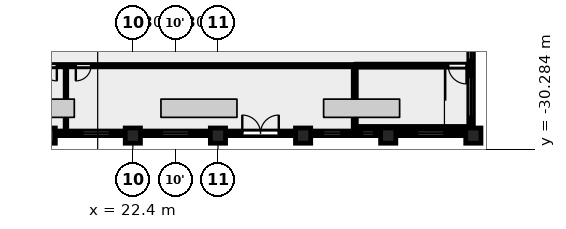
"""IFC4 building model, lengths in metres.
Left out: names, types, materials, properties, quantities, classifications, styles, units other than length and angle.
Written with IfcOpenShell. Run it as: python <this file> out.ifc"""

import sys

from ifc_helpers import new_model, si_unit, direction, frame, frame_2d, origin, origin_2d, place, context, subcontext, project, spatial, rectangle, circle, extrude, element, fill, save


model = new_model("IFC4")
c1 = context("Model", 3, precision=1e-05, world=origin(), true_north=direction((0.0, 1.0)))
c2 = subcontext(c1, "Body", "Model", "MODEL_VIEW")
j1 = project(units=[si_unit("LENGTHUNIT", "METRE"), si_unit("PLANEANGLEUNIT", "RADIAN")], contexts=[c1])
p1 = place(None, origin())
s1 = spatial("IfcSite", under=j1, at=p1, CompositionType="ELEMENT")
p2 = place(p1, origin())
s2 = spatial("IfcBuilding", under=s1, at=p2, CompositionType="ELEMENT")
p3 = place(p2, frame((0.0, 0.0, 25.7)))
s3 = spatial("IfcBuildingStorey", under=s2, at=p3, CompositionType="ELEMENT", Elevation=25.7)
for number, where, z_axis, x_axis in (
    (1, (16.8, -29.4, 0.0), (0.0, 0.0, 1.0), (1.0, 0.0, 0.0)),
    (2, (22.4, -29.4, 0.0), (0.0, 0.0, 1.0), (1.0, 0.0, 0.0)),
    (3, (28.0, -29.4, 0.0), (0.0, 0.0, 1.0), (1.0, 0.0, 0.0)),
    (4, (33.6, -29.4, 0.0), (0.0, 0.0, 1.0), (1.0, 0.0, 0.0)),
    (5, (39.2, -29.4, 0.0), (0.0, 0.0, 1.0), (1.0, 0.0, 0.0)),
    (6, (44.8, -29.4, 0.0), (0.0, 0.0, 1.0), (1.0, 0.0, 0.0)),
):
    element("IfcColumn", number, at=place(p3, frame(where, z_axis=z_axis, x_axis=x_axis)), inside=s3, PredefinedType="COLUMN", context=c2, shape_type="SweptSolid", body=[
        extrude(circle(Radius=0.5, at=origin_2d()), origin(), (0.0, 0.0, 1.0), 4.8),
    ])
p4 = place(p3, frame((44.65, -28.9, 0.0), z_axis=(0.0, 0.0, 1.0), x_axis=(0.0, 1.0, 0.0)))
e7 = element("IfcWall", 7, at=p4, inside=s3, PredefinedType="SOLIDWALL", context=c2, shape_type="SweptSolid", body=[
    extrude(rectangle(XDim=6.0, YDim=0.3, at=frame_2d((3.0, 0.0))), origin(), (0.0, 0.0, 1.0), 3.65),
])
p5 = place(p4, frame((0.75, 0.0, 0.9)))
e8 = element("IfcOpeningElement", 8, at=p5, cuts=e7, PredefinedType="OPENING", context=c2, shape_type="SweptSolid", body=[
    extrude(rectangle(XDim=2.6, YDim=1.25, at=frame_2d((1.3, 0.625))), frame((0.0, 0.16, 0.0), z_axis=(0.0, -1.0, 0.0), x_axis=(1.0, 0.0, 0.0)), (0.0, 0.0, 1.0), 0.32),
])
p6 = place(p4, frame((4.488, 0.0, 0.6)))
e9 = element("IfcOpeningElement", 9, at=p6, cuts=e7, PredefinedType="OPENING", context=c2, shape_type="SweptSolid", body=[
    extrude(rectangle(XDim=1.2, YDim=1.55, at=frame_2d((0.6, 0.775))), frame((0.0, 0.16, 0.0), z_axis=(0.0, -1.0, 0.0), x_axis=(1.0, 0.0, 0.0)), (0.0, 0.0, 1.0), 0.32),
])
p7 = place(p3, frame((17.3, -29.25, 0.0), z_axis=(0.0, 0.0, 1.0), x_axis=(1.0, 0.0, 0.0)))
e10 = element("IfcWall", 10, at=p7, inside=s3, PredefinedType="SOLIDWALL", context=c2, shape_type="SweptSolid", body=[
    extrude(rectangle(XDim=4.6, YDim=0.3, at=frame_2d((2.3, 0.0))), origin(), (0.0, 0.0, 1.0), 3.65),
])
p8 = place(p7, frame((1.788, 0.0, 0.9)))
e11 = element("IfcOpeningElement", 11, at=p8, cuts=e10, PredefinedType="OPENING", context=c2, shape_type="SweptSolid", body=[
    extrude(rectangle(XDim=1.8, YDim=1.25, at=frame_2d((0.9, 0.625))), frame((0.0, 0.16, 0.0), z_axis=(0.0, -1.0, 0.0), x_axis=(1.0, 0.0, 0.0)), (0.0, 0.0, 1.0), 0.32),
])
p9 = place(p3, frame((22.9, -29.25, 0.0), z_axis=(0.0, 0.0, 1.0), x_axis=(1.0, 0.0, 0.0)))
e12 = element("IfcWall", 12, at=p9, inside=s3, PredefinedType="SOLIDWALL", context=c2, shape_type="SweptSolid", body=[
    extrude(rectangle(XDim=4.6, YDim=0.3, at=frame_2d((2.3, 0.0))), origin(), (0.0, 0.0, 1.0), 3.65),
])
p10 = place(p9, frame((1.4, 0.0, 0.9)))
e13 = element("IfcOpeningElement", 13, at=p10, cuts=e12, PredefinedType="OPENING", context=c2, shape_type="SweptSolid", body=[
    extrude(rectangle(XDim=1.8, YDim=1.25, at=frame_2d((0.9, 0.625))), frame((0.0, 0.16, 0.0), z_axis=(0.0, -1.0, 0.0), x_axis=(1.0, 0.0, 0.0)), (0.0, 0.0, 1.0), 0.32),
])
p11 = place(p3, frame((28.5, -29.25, 0.0), z_axis=(0.0, 0.0, 1.0), x_axis=(1.0, 0.0, 0.0)))
e14 = element("IfcWall", 14, at=p11, inside=s3, PredefinedType="SOLIDWALL", context=c2, shape_type="SweptSolid", body=[
    extrude(rectangle(XDim=4.6, YDim=0.3, at=frame_2d((2.3, 0.0))), origin(), (0.0, 0.0, 1.0), 3.65),
])
p12 = place(p11, frame((1.1, 0.0, 0.0)))
e15 = element("IfcOpeningElement", 15, at=p12, cuts=e14, PredefinedType="OPENING", context=c2, shape_type="SweptSolid", body=[
    extrude(rectangle(XDim=2.4, YDim=2.3, at=frame_2d((1.2, 1.15))), frame((0.0, 0.16, 0.0), z_axis=(0.0, -1.0, 0.0), x_axis=(1.0, 0.0, 0.0)), (0.0, 0.0, 1.0), 0.32),
])
p13 = place(p3, frame((34.1, -29.25, 0.0), z_axis=(0.0, 0.0, 1.0), x_axis=(1.0, 0.0, 0.0)))
e16 = element("IfcWall", 16, at=p13, inside=s3, PredefinedType="SOLIDWALL", context=c2, shape_type="SweptSolid", body=[
    extrude(rectangle(XDim=4.6, YDim=0.3, at=frame_2d((2.3, 0.0))), origin(), (0.0, 0.0, 1.0), 3.65),
])
p14 = place(p13, frame((0.812, 0.0, 0.6)))
e17 = element("IfcOpeningElement", 17, at=p14, cuts=e16, PredefinedType="OPENING", context=c2, shape_type="SweptSolid", body=[
    extrude(rectangle(XDim=1.2, YDim=1.55, at=frame_2d((0.6, 0.775))), frame((0.0, 0.16, 0.0), z_axis=(0.0, -1.0, 0.0), x_axis=(1.0, 0.0, 0.0)), (0.0, 0.0, 1.0), 0.32),
])
p15 = place(p13, frame((3.387, 0.0, 0.6)))
e18 = element("IfcOpeningElement", 18, at=p15, cuts=e16, PredefinedType="OPENING", context=c2, shape_type="SweptSolid", body=[
    extrude(rectangle(XDim=0.8, YDim=1.55, at=frame_2d((0.4, 0.775))), frame((0.0, 0.16, 0.0), z_axis=(0.0, -1.0, 0.0), x_axis=(1.0, 0.0, 0.0)), (0.0, 0.0, 1.0), 0.32),
])
p16 = place(p3, frame((39.7, -29.25, 0.0), z_axis=(0.0, 0.0, 1.0), x_axis=(1.0, 0.0, 0.0)))
e19 = element("IfcWall", 19, at=p16, inside=s3, PredefinedType="SOLIDWALL", context=c2, shape_type="SweptSolid", body=[
    extrude(rectangle(XDim=4.6, YDim=0.3, at=frame_2d((2.3, 0.0))), origin(), (0.0, 0.0, 1.0), 3.65),
])
p17 = place(p16, frame((1.4, 0.0, 0.9)))
e20 = element("IfcOpeningElement", 20, at=p17, cuts=e19, PredefinedType="OPENING", context=c2, shape_type="SweptSolid", body=[
    extrude(rectangle(XDim=1.8, YDim=1.25, at=frame_2d((0.9, 0.625))), frame((0.0, 0.16, 0.0), z_axis=(0.0, -1.0, 0.0), x_axis=(1.0, 0.0, 0.0)), (0.0, 0.0, 1.0), 0.32),
])
p18 = place(p3, frame((36.9, -28.9, 0.0), z_axis=(0.0, 0.0, 1.0), x_axis=(1.0, 0.0, 0.0)))
e21 = element("IfcWall", 21, at=p18, inside=s3, PredefinedType="SHEAR", context=c2, shape_type="SweptSolid", body=[
    extrude(rectangle(XDim=7.81, YDim=0.2, at=frame_2d((3.905, 0.0))), origin(), (0.0, 0.0, 1.0), 4.45),
])
p19 = place(p3, frame((-37.0, -24.8, 0.0), z_axis=(0.0, 0.0, 1.0), x_axis=(1.0, 0.0, 0.0)))
e22 = element("IfcWall", 22, at=p19, inside=s3, PredefinedType="PARTITIONING", context=c2, shape_type="SweptSolid", body=[
    extrude(rectangle(XDim=74.0, YDim=0.15, at=frame_2d((37.0, 0.0))), origin(), (0.0, 0.0, 1.0), 4.45),
])
p20 = place(p19, frame((6.65, 0.0, 0.0)))
e23 = element("IfcOpeningElement", 23, at=p20, cuts=e22, PredefinedType="OPENING", context=c2, shape_type="SweptSolid", body=[
    extrude(rectangle(XDim=1.0, YDim=2.1, at=frame_2d((0.5, 1.05))), frame((0.0, 0.085, 0.0), z_axis=(0.0, -1.0, 0.0), x_axis=(1.0, 0.0, 0.0)), (0.0, 0.0, 1.0), 0.17),
])
p21 = place(p19, frame((8.85, 0.0, 0.0)))
e24 = element("IfcOpeningElement", 24, at=p21, cuts=e22, PredefinedType="OPENING", context=c2, shape_type="SweptSolid", body=[
    extrude(rectangle(XDim=0.9, YDim=2.1, at=frame_2d((0.45, 1.05))), frame((0.0, 0.085, 0.0), z_axis=(0.0, -1.0, 0.0), x_axis=(1.0, 0.0, 0.0)), (0.0, 0.0, 1.0), 0.17),
])
p22 = place(p19, frame((35.35, 0.0, 0.0)))
e25 = element("IfcOpeningElement", 25, at=p22, cuts=e22, PredefinedType="OPENING", context=c2, shape_type="SweptSolid", body=[
    extrude(rectangle(XDim=1.0, YDim=2.1, at=frame_2d((0.5, 1.05))), frame((0.0, 0.085, 0.0), z_axis=(0.0, -1.0, 0.0), x_axis=(1.0, 0.0, 0.0)), (0.0, 0.0, 1.0), 0.17),
])
p23 = place(p19, frame((37.65, 0.0, 0.0)))
e26 = element("IfcOpeningElement", 26, at=p23, cuts=e22, PredefinedType="OPENING", context=c2, shape_type="SweptSolid", body=[
    extrude(rectangle(XDim=0.9, YDim=2.1, at=frame_2d((0.45, 1.05))), frame((0.0, 0.085, 0.0), z_axis=(0.0, -1.0, 0.0), x_axis=(1.0, 0.0, 0.0)), (0.0, 0.0, 1.0), 0.17),
])
p24 = place(p19, frame((53.4, 0.0, 0.0)))
e27 = element("IfcOpeningElement", 27, at=p24, cuts=e22, PredefinedType="OPENING", context=c2, shape_type="SweptSolid", body=[
    extrude(rectangle(XDim=1.0, YDim=2.1, at=frame_2d((0.5, 1.05))), frame((0.0, 0.085, 0.0), z_axis=(0.0, -1.0, 0.0), x_axis=(1.0, 0.0, 0.0)), (0.0, 0.0, 1.0), 0.17),
])
p25 = place(p19, frame((55.65, 0.0, 0.0)))
e28 = element("IfcOpeningElement", 28, at=p25, cuts=e22, PredefinedType="OPENING", context=c2, shape_type="SweptSolid", body=[
    extrude(rectangle(XDim=1.0, YDim=2.1, at=frame_2d((0.5, 1.05))), frame((0.0, 0.085, 0.0), z_axis=(0.0, -1.0, 0.0), x_axis=(1.0, 0.0, 0.0)), (0.0, 0.0, 1.0), 0.17),
])
p26 = place(p3, frame((37.0, -24.8, 0.0), z_axis=(0.0, 0.0, 1.0), x_axis=(1.0, 0.0, 0.0)))
e29 = element("IfcWall", 29, at=p26, inside=s3, PredefinedType="SHEAR", context=c2, shape_type="SweptSolid", body=[
    extrude(rectangle(XDim=7.71, YDim=0.2, at=frame_2d((3.855, 0.0))), origin(), (0.0, 0.0, 1.0), 4.45),
])
p27 = place(p26, frame((6.15, 0.0, 0.0)))
e30 = element("IfcOpeningElement", 30, at=p27, cuts=e29, PredefinedType="OPENING", context=c2, shape_type="SweptSolid", body=[
    extrude(rectangle(XDim=1.2, YDim=2.1, at=frame_2d((0.6, 1.05))), frame((0.0, 0.11, 0.0), z_axis=(0.0, -1.0, 0.0), x_axis=(1.0, 0.0, 0.0)), (0.0, 0.0, 1.0), 0.22),
])
p28 = place(p3, frame((18.0, -29.08, 0.0), z_axis=(0.0, 0.0, 1.0), x_axis=(0.0, 1.0, 0.0)))
e31 = element("IfcWall", 31, at=p28, inside=s3, PredefinedType="PARTITIONING", context=c2, shape_type="SweptSolid", body=[
    extrude(rectangle(XDim=4.205, YDim=0.1, at=frame_2d((2.103, 0.0))), origin(), (0.0, 0.0, 1.0), 4.45),
])
p29 = place(p3, frame((37.0, -28.8, 0.0), z_axis=(0.0, 0.0, 1.0), x_axis=(0.0, 1.0, 0.0)))
e32 = element("IfcWall", 32, at=p29, inside=s3, PredefinedType="SHEAR", context=c2, shape_type="SweptSolid", body=[
    extrude(rectangle(XDim=3.925, YDim=0.2, at=frame_2d((1.962, 0.0))), origin(), (0.0, 0.0, 1.0), 4.45),
])
p30 = place(p12, origin())
e33 = element("IfcDoor", 33, at=p30, inside=s3, OperationType="SINGLE_SWING_LEFT", PredefinedType="DOOR", context=c2, shape_type="SweptSolid", body=[
    extrude(rectangle(XDim=2.4, YDim=2.3, at=frame_2d((1.2, 1.15))), frame((0.0, 0.025, 0.0), z_axis=(0.0, -1.0, 0.0), x_axis=(1.0, 0.0, 0.0)), (0.0, 0.0, 1.0), 0.05),
])
fill(e15, e33)
p31 = place(p27, origin())
e34 = element("IfcDoor", 34, at=p31, inside=s3, OperationType="SINGLE_SWING_RIGHT", PredefinedType="DOOR", context=c2, shape_type="SweptSolid", body=[
    extrude(rectangle(XDim=1.2, YDim=2.1, at=frame_2d((0.6, 1.05))), frame((0.0, 0.025, 0.0), z_axis=(0.0, -1.0, 0.0), x_axis=(1.0, 0.0, 0.0)), (0.0, 0.0, 1.0), 0.05),
])
fill(e30, e34)
p32 = place(p24, origin())
e35 = element("IfcDoor", 35, at=p32, inside=s3, OperationType="SINGLE_SWING_RIGHT", PredefinedType="DOOR", context=c2, shape_type="SweptSolid", body=[
    extrude(rectangle(XDim=1.0, YDim=2.1, at=frame_2d((0.5, 1.05))), frame((0.0, 0.025, 0.0), z_axis=(0.0, -1.0, 0.0), x_axis=(1.0, 0.0, 0.0)), (0.0, 0.0, 1.0), 0.05),
])
fill(e27, e35)
p33 = place(p25, origin())
e36 = element("IfcDoor", 36, at=p33, inside=s3, OperationType="SINGLE_SWING_LEFT", PredefinedType="DOOR", context=c2, shape_type="SweptSolid", body=[
    extrude(rectangle(XDim=1.0, YDim=2.1, at=frame_2d((0.5, 1.05))), frame((0.0, 0.025, 0.0), z_axis=(0.0, -1.0, 0.0), x_axis=(1.0, 0.0, 0.0)), (0.0, 0.0, 1.0), 0.05),
])
fill(e28, e36)
p34 = place(p5, origin())
e37 = element("IfcWindow", 37, at=p34, inside=s3, PartitioningType="SINGLE_PANEL", PredefinedType="WINDOW", context=c2, shape_type="SweptSolid", body=[
    extrude(rectangle(XDim=2.6, YDim=1.25, at=frame_2d((1.3, 0.625))), frame((0.0, 0.03, 0.0), z_axis=(0.0, -1.0, 0.0), x_axis=(1.0, 0.0, 0.0)), (0.0, 0.0, 1.0), 0.06),
])
fill(e8, e37)
p35 = place(p6, origin())
e38 = element("IfcWindow", 38, at=p35, inside=s3, PartitioningType="SINGLE_PANEL", PredefinedType="WINDOW", context=c2, shape_type="SweptSolid", body=[
    extrude(rectangle(XDim=1.2, YDim=1.55, at=frame_2d((0.6, 0.775))), frame((0.0, 0.03, 0.0), z_axis=(0.0, -1.0, 0.0), x_axis=(1.0, 0.0, 0.0)), (0.0, 0.0, 1.0), 0.06),
])
fill(e9, e38)
p36 = place(p8, origin())
e39 = element("IfcWindow", 39, at=p36, inside=s3, PartitioningType="SINGLE_PANEL", PredefinedType="WINDOW", context=c2, shape_type="SweptSolid", body=[
    extrude(rectangle(XDim=1.8, YDim=1.25, at=frame_2d((0.9, 0.625))), frame((0.0, 0.03, 0.0), z_axis=(0.0, -1.0, 0.0), x_axis=(1.0, 0.0, 0.0)), (0.0, 0.0, 1.0), 0.06),
])
fill(e11, e39)
p37 = place(p10, origin())
e40 = element("IfcWindow", 40, at=p37, inside=s3, PartitioningType="SINGLE_PANEL", PredefinedType="WINDOW", context=c2, shape_type="SweptSolid", body=[
    extrude(rectangle(XDim=1.8, YDim=1.25, at=frame_2d((0.9, 0.625))), frame((0.0, 0.03, 0.0), z_axis=(0.0, -1.0, 0.0), x_axis=(1.0, 0.0, 0.0)), (0.0, 0.0, 1.0), 0.06),
])
fill(e13, e40)
p38 = place(p14, origin())
e41 = element("IfcWindow", 41, at=p38, inside=s3, PartitioningType="SINGLE_PANEL", PredefinedType="WINDOW", context=c2, shape_type="SweptSolid", body=[
    extrude(rectangle(XDim=1.2, YDim=1.55, at=frame_2d((0.6, 0.775))), frame((0.0, 0.03, 0.0), z_axis=(0.0, -1.0, 0.0), x_axis=(1.0, 0.0, 0.0)), (0.0, 0.0, 1.0), 0.06),
])
fill(e17, e41)
p39 = place(p15, origin())
e42 = element("IfcWindow", 42, at=p39, inside=s3, PartitioningType="SINGLE_PANEL", PredefinedType="WINDOW", context=c2, shape_type="SweptSolid", body=[
    extrude(rectangle(XDim=0.8, YDim=1.55, at=frame_2d((0.4, 0.775))), frame((0.0, 0.03, 0.0), z_axis=(0.0, -1.0, 0.0), x_axis=(1.0, 0.0, 0.0)), (0.0, 0.0, 1.0), 0.06),
])
fill(e18, e42)
p40 = place(p17, origin())
e43 = element("IfcWindow", 43, at=p40, inside=s3, PartitioningType="SINGLE_PANEL", PredefinedType="WINDOW", context=c2, shape_type="SweptSolid", body=[
    extrude(rectangle(XDim=1.8, YDim=1.25, at=frame_2d((0.9, 0.625))), frame((0.0, 0.03, 0.0), z_axis=(0.0, -1.0, 0.0), x_axis=(1.0, 0.0, 0.0)), (0.0, 0.0, 1.0), 0.06),
])
fill(e20, e43)
save(model, sys.argv[1])
